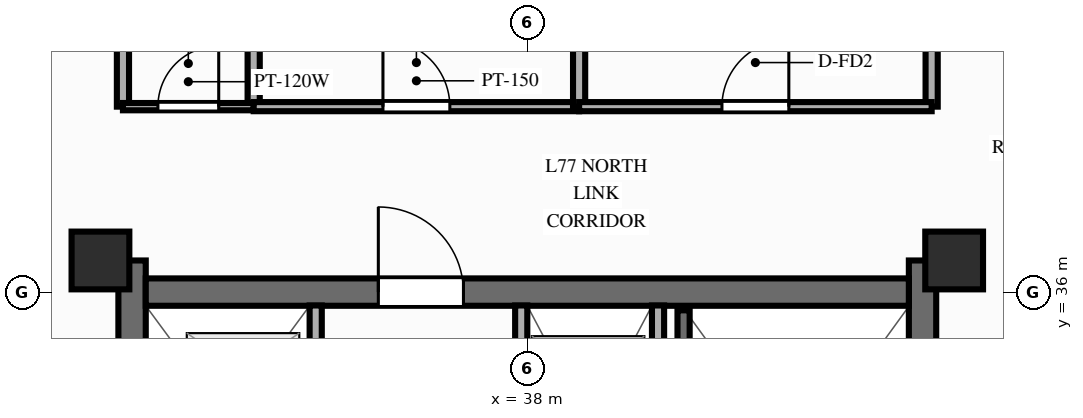
"""IFC4 building model, lengths in metres.
Left out: names, types, materials, properties, quantities, classifications, styles, units other than length and angle.
Written with IfcOpenShell. Run it as: python <this file> out.ifc"""

import sys

from ifc_helpers import new_model, si_unit, direction, frame, frame_2d, origin, origin_2d, place, context, subcontext, project, spatial, rectangle, extrude, source, transform, mapped, element, fill, save


model = new_model("IFC4")
c1 = context("Model", 3, precision=1e-05, world=origin(), true_north=direction((0.0, 1.0)))
c2 = subcontext(c1, "Body", "Model", "MODEL_VIEW")
j1 = project(units=[si_unit("LENGTHUNIT", "METRE"), si_unit("PLANEANGLEUNIT", "RADIAN")], contexts=[c1])
p1 = place(None, origin())
s1 = spatial("IfcSite", under=j1, at=p1, CompositionType="ELEMENT")
p2 = place(p1, origin())
s2 = spatial("IfcBuilding", under=s1, at=p2, CompositionType="ELEMENT")
p3 = place(p2, frame((0.0, 0.0, 249.0)))
s3 = spatial("IfcBuildingStorey", under=s2, at=p3, CompositionType="ELEMENT", Elevation=249.0)
p4 = place(p3, frame((31.5, 17.48, 0.0), z_axis=(0.0, 0.0, 1.0), x_axis=(0.0, 1.0, 0.0)))
e1 = element("IfcWall", 1, at=p4, inside=s3, PredefinedType="SHEAR", context=c2, shape_type="SweptSolid", body=[
    extrude(rectangle(XDim=19.04, YDim=0.45, at=frame_2d((9.52, 0.0))), origin(), (0.0, 0.0, 1.0), 3.2),
])
p5 = place(p4, frame((6.32, 0.0, 0.0)))
e2 = element("IfcOpeningElement", 2, at=p5, cuts=e1, PredefinedType="OPENING", context=c2, shape_type="SweptSolid", body=[
    extrude(rectangle(XDim=1.1, YDim=2.15, at=frame_2d((0.55, 1.075))), frame((0.0, 0.237, 0.0), z_axis=(0.0, -1.0, 0.0), x_axis=(1.0, 0.0, 0.0)), (0.0, 0.0, 1.0), 0.474),
])
p6 = place(p3, frame((44.5, 17.48, 0.0), z_axis=(0.0, 0.0, 1.0), x_axis=(0.0, 1.0, 0.0)))
e3 = element("IfcWall", 3, at=p6, inside=s3, PredefinedType="SHEAR", context=c2, shape_type="SweptSolid", body=[
    extrude(rectangle(XDim=19.04, YDim=0.45, at=frame_2d((9.52, 0.0))), origin(), (0.0, 0.0, 1.0), 3.2),
])
p7 = place(p6, frame((12.67, 0.0, 0.0), z_axis=(0.0, 0.0, 1.0), x_axis=(-1.0, 0.0, 0.0)))
e4 = element("IfcOpeningElement", 4, at=p7, cuts=e3, PredefinedType="OPENING", context=c2, shape_type="SweptSolid", body=[
    extrude(rectangle(XDim=1.1, YDim=2.15, at=frame_2d((0.55, 1.075))), frame((0.0, 0.237, 0.0), z_axis=(0.0, -1.0, 0.0), x_axis=(1.0, 0.0, 0.0)), (0.0, 0.0, 1.0), 0.474),
])
p8 = place(p3, frame((31.725, 36.0, 0.0), z_axis=(0.0, 0.0, 1.0), x_axis=(1.0, 0.0, 0.0)))
e5 = element("IfcWall", 5, at=p8, inside=s3, PredefinedType="SHEAR", context=c2, shape_type="SweptSolid", body=[
    extrude(rectangle(XDim=12.55, YDim=0.45, at=frame_2d((6.275, 0.0))), origin(), (0.0, 0.0, 1.0), 3.2),
])
p9 = place(p8, frame((5.225, 0.0, 0.0), z_axis=(0.0, 0.0, 1.0), x_axis=(-1.0, 0.0, 0.0)))
e6 = element("IfcOpeningElement", 6, at=p9, cuts=e5, PredefinedType="OPENING", context=c2, shape_type="SweptSolid", body=[
    extrude(rectangle(XDim=1.4, YDim=2.15, at=frame_2d((0.7, 1.075))), frame((0.0, 0.237, 0.0), z_axis=(0.0, -1.0, 0.0), x_axis=(1.0, 0.0, 0.0)), (0.0, 0.0, 1.0), 0.474),
])
m1 = source(origin(), c2, "Body", "SweptSolid", [
    extrude(rectangle(XDim=0.95, YDim=0.95, at=origin_2d()), origin(), (0.0, 0.0, 1.0), 3.2),
])
for number, where, z_axis, x_axis in (
    (7, (30.98, 36.52, 0.0), (0.0, 0.0, 1.0), (1.0, 0.0, 0.0)),
    (8, (45.02, 36.52, 0.0), (0.0, 0.0, 1.0), (1.0, 0.0, 0.0)),
):
    element("IfcColumn", number, at=place(p3, frame(where, z_axis=z_axis, x_axis=x_axis)), inside=s3, PredefinedType="COLUMN", context=c2, shape_type="MappedRepresentation", body=[
        mapped(m1, transform((0.0, 0.0, 0.0), scale=1.0)),
    ])
p10 = place(p3, frame((40.15, 31.8, 0.0), z_axis=(0.0, 0.0, 1.0), x_axis=(0.0, 1.0, 0.0)))
e9 = element("IfcWall", 9, at=p10, inside=s3, PredefinedType="PARTITIONING", context=c2, shape_type="SweptSolid", body=[
    extrude(rectangle(XDim=3.98, YDim=0.2, at=frame_2d((1.99, 0.0))), origin(), (0.0, 0.0, 1.0), 2.88),
])
p11 = place(p3, frame((40.57, 28.65, 0.0), z_axis=(0.0, 0.0, 1.0), x_axis=(0.0, 1.0, 0.0)))
e10 = element("IfcWall", 10, at=p11, inside=s3, PredefinedType="SOLIDWALL", context=c2, shape_type="SweptSolid", body=[
    extrude(rectangle(XDim=7.05, YDim=0.2, at=frame_2d((3.525, 0.0))), origin(), (0.0, 0.0, 1.0), 2.88),
])
p12 = place(p3, frame((34.52, 25.44, 0.0), z_axis=(0.0, 0.0, 1.0), x_axis=(0.0, 1.0, 0.0)))
e11 = element("IfcWall", 11, at=p12, inside=s3, PredefinedType="PARTITIONING", context=c2, shape_type="SweptSolid", body=[
    extrude(rectangle(XDim=10.34, YDim=0.2, at=frame_2d((5.17, 0.0))), origin(), (0.0, 0.0, 1.0), 2.88),
])
p13 = place(p12, frame((2.6, 0.0, 0.0)))
e12 = element("IfcOpeningElement", 12, at=p13, cuts=e11, PredefinedType="OPENING", context=c2, shape_type="SweptSolid", body=[
    extrude(rectangle(XDim=0.9, YDim=2.1, at=frame_2d((0.45, 1.05))), frame((0.0, 0.112, 0.0), z_axis=(0.0, -1.0, 0.0), x_axis=(1.0, 0.0, 0.0)), (0.0, 0.0, 1.0), 0.224),
])
p14 = place(p12, frame((7.01, 0.0, 0.0)))
e13 = element("IfcOpeningElement", 13, at=p14, cuts=e11, PredefinedType="OPENING", context=c2, shape_type="SweptSolid", body=[
    extrude(rectangle(XDim=1.0, YDim=2.15, at=frame_2d((0.5, 1.075))), frame((0.0, 0.112, 0.0), z_axis=(0.0, -1.0, 0.0), x_axis=(1.0, 0.0, 0.0)), (0.0, 0.0, 1.0), 0.224),
])
p15 = place(p12, frame((8.76, 0.0, 0.0)))
e14 = element("IfcOpeningElement", 14, at=p15, cuts=e11, PredefinedType="OPENING", context=c2, shape_type="SweptSolid", body=[
    extrude(rectangle(XDim=1.0, YDim=2.15, at=frame_2d((0.5, 1.075))), frame((0.0, 0.112, 0.0), z_axis=(0.0, -1.0, 0.0), x_axis=(1.0, 0.0, 0.0)), (0.0, 0.0, 1.0), 0.224),
])
p16 = place(p3, frame((37.9, 25.44, 0.0), z_axis=(0.0, 0.0, 1.0), x_axis=(0.0, 1.0, 0.0)))
e15 = element("IfcWall", 15, at=p16, inside=s3, PredefinedType="PARTITIONING", context=c2, shape_type="SweptSolid", body=[
    extrude(rectangle(XDim=10.34, YDim=0.2, at=frame_2d((5.17, 0.0))), origin(), (0.0, 0.0, 1.0), 2.88),
])
p17 = place(p16, frame((2.6, 0.0, 0.0)))
e16 = element("IfcOpeningElement", 16, at=p17, cuts=e15, PredefinedType="OPENING", context=c2, shape_type="SweptSolid", body=[
    extrude(rectangle(XDim=0.9, YDim=2.1, at=frame_2d((0.45, 1.05))), frame((0.0, 0.112, 0.0), z_axis=(0.0, -1.0, 0.0), x_axis=(1.0, 0.0, 0.0)), (0.0, 0.0, 1.0), 0.224),
])
p18 = place(p16, frame((6.86, 0.0, 0.0)))
e17 = element("IfcOpeningElement", 17, at=p18, cuts=e15, PredefinedType="OPENING", context=c2, shape_type="SweptSolid", body=[
    extrude(rectangle(XDim=1.0, YDim=2.15, at=frame_2d((0.5, 1.075))), frame((0.0, 0.112, 0.0), z_axis=(0.0, -1.0, 0.0), x_axis=(1.0, 0.0, 0.0)), (0.0, 0.0, 1.0), 0.224),
])
p19 = place(p16, frame((8.71, 0.0, 0.0)))
e18 = element("IfcOpeningElement", 18, at=p19, cuts=e15, PredefinedType="OPENING", context=c2, shape_type="SweptSolid", body=[
    extrude(rectangle(XDim=1.0, YDim=2.15, at=frame_2d((0.5, 1.075))), frame((0.0, 0.112, 0.0), z_axis=(0.0, -1.0, 0.0), x_axis=(1.0, 0.0, 0.0)), (0.0, 0.0, 1.0), 0.224),
])
for number, where, z_axis, x_axis in (
    (19, (31.35, 39.05, 0.0), (0.0, 0.0, 1.0), (0.0, 1.0, 0.0)),
    (20, (44.65, 39.05, 0.0), (0.0, 0.0, 1.0), (0.0, 1.0, 0.0)),
):
    element("IfcWall", number, at=place(p3, frame(where, z_axis=z_axis, x_axis=x_axis)), inside=s3, PredefinedType="PARTITIONING", context=c2, shape_type="SweptSolid", body=[
        extrude(rectangle(XDim=8.8, YDim=0.2, at=frame_2d((4.4, 0.0))), origin(), (0.0, 0.0, 1.0), 2.59),
    ])
p20 = place(p3, frame((33.5, 39.05, 0.0), z_axis=(0.0, 0.0, 1.0), x_axis=(0.0, 1.0, 0.0)))
e21 = element("IfcWall", 21, at=p20, inside=s3, PredefinedType="PARTITIONING", context=c2, shape_type="SweptSolid", body=[
    extrude(rectangle(XDim=8.8, YDim=0.2, at=frame_2d((4.4, 0.0))), origin(), (0.0, 0.0, 1.0), 2.88),
])
p21 = place(p3, frame((31.35, 39.05, 0.0), z_axis=(0.0, 0.0, 1.0), x_axis=(1.0, 0.0, 0.0)))
e22 = element("IfcWall", 22, at=p21, inside=s3, PredefinedType="PARTITIONING", context=c2, shape_type="SweptSolid", body=[
    extrude(rectangle(XDim=2.15, YDim=0.12, at=frame_2d((1.075, 0.0))), origin(), (0.0, 0.0, 1.0), 2.88),
])
p22 = place(p21, frame((0.575, 0.0, 0.0)))
e23 = element("IfcOpeningElement", 23, at=p22, cuts=e22, PredefinedType="OPENING", context=c2, shape_type="SweptSolid", body=[
    extrude(rectangle(XDim=1.0, YDim=2.1, at=frame_2d((0.5, 1.05))), frame((0.0, 0.072, 0.0), z_axis=(0.0, -1.0, 0.0), x_axis=(1.0, 0.0, 0.0)), (0.0, 0.0, 1.0), 0.144),
])
p23 = place(p3, frame((33.5, 39.05, 0.0), z_axis=(0.0, 0.0, 1.0), x_axis=(1.0, 0.0, 0.0)))
e24 = element("IfcWall", 24, at=p23, inside=s3, PredefinedType="PARTITIONING", context=c2, shape_type="SweptSolid", body=[
    extrude(rectangle(XDim=5.352, YDim=0.15, at=frame_2d((2.676, 0.0))), origin(), (0.0, 0.0, 1.0), 2.88),
])
p24 = place(p23, frame((2.126, 0.0, 0.0)))
e25 = element("IfcOpeningElement", 25, at=p24, cuts=e24, PredefinedType="OPENING", context=c2, shape_type="SweptSolid", body=[
    extrude(rectangle(XDim=1.1, YDim=2.15, at=frame_2d((0.55, 1.075))), frame((0.0, 0.087, 0.0), z_axis=(0.0, -1.0, 0.0), x_axis=(1.0, 0.0, 0.0)), (0.0, 0.0, 1.0), 0.174),
])
p25 = place(p3, frame((38.852, 39.05, 0.0), z_axis=(0.0, 0.0, 1.0), x_axis=(0.0, 1.0, 0.0)))
e26 = element("IfcWall", 26, at=p25, inside=s3, PredefinedType="PARTITIONING", context=c2, shape_type="SweptSolid", body=[
    extrude(rectangle(XDim=8.8, YDim=0.2, at=frame_2d((4.4, 0.0))), origin(), (0.0, 0.0, 1.0), 2.88),
])
p26 = place(p3, frame((38.852, 39.05, 0.0), z_axis=(0.0, 0.0, 1.0), x_axis=(1.0, 0.0, 0.0)))
e27 = element("IfcWall", 27, at=p26, inside=s3, PredefinedType="PARTITIONING", context=c2, shape_type="SweptSolid", body=[
    extrude(rectangle(XDim=5.798, YDim=0.15, at=frame_2d((2.899, 0.0))), origin(), (0.0, 0.0, 1.0), 2.88),
])
p27 = place(p26, frame((2.349, 0.0, 0.0)))
e28 = element("IfcOpeningElement", 28, at=p27, cuts=e27, PredefinedType="OPENING", context=c2, shape_type="SweptSolid", body=[
    extrude(rectangle(XDim=1.1, YDim=2.15, at=frame_2d((0.55, 1.075))), frame((0.0, 0.087, 0.0), z_axis=(0.0, -1.0, 0.0), x_axis=(1.0, 0.0, 0.0)), (0.0, 0.0, 1.0), 0.174),
])
m2 = source(origin(), c2, "Body", "SweptSolid", [
    extrude(rectangle(XDim=1.4, YDim=2.15, at=frame_2d((0.7, 1.075))), frame((0.0, 0.025, 0.0), z_axis=(0.0, -1.0, 0.0), x_axis=(1.0, 0.0, 0.0)), (0.0, 0.0, 1.0), 0.05),
])
p28 = place(p9, origin())
e29 = element("IfcDoor", 29, at=p28, inside=s3, OperationType="SINGLE_SWING_RIGHT", PredefinedType="DOOR", context=c2, shape_type="MappedRepresentation", body=[
    mapped(m2, transform((0.0, 0.0, 0.0), scale=1.0)),
])
fill(e6, e29)
m3 = source(origin(), c2, "Body", "SweptSolid", [
    extrude(rectangle(XDim=1.0, YDim=2.1, at=frame_2d((0.5, 1.05))), frame((0.0, 0.025, 0.0), z_axis=(0.0, -1.0, 0.0), x_axis=(1.0, 0.0, 0.0)), (0.0, 0.0, 1.0), 0.05),
])
p29 = place(p22, origin())
e30 = element("IfcDoor", 30, at=p29, inside=s3, OperationType="SINGLE_SWING_RIGHT", PredefinedType="DOOR", context=c2, shape_type="MappedRepresentation", body=[
    mapped(m3, transform((0.0, 0.0, 0.0), scale=1.0)),
])
fill(e23, e30)
m4 = source(origin(), c2, "Body", "SweptSolid", [
    extrude(rectangle(XDim=1.1, YDim=2.15, at=frame_2d((0.55, 1.075))), frame((0.0, 0.025, 0.0), z_axis=(0.0, -1.0, 0.0), x_axis=(1.0, 0.0, 0.0)), (0.0, 0.0, 1.0), 0.05),
])
p30 = place(p24, origin())
e31 = element("IfcDoor", 31, at=p30, inside=s3, OperationType="SINGLE_SWING_LEFT", PredefinedType="DOOR", context=c2, shape_type="MappedRepresentation", body=[
    mapped(m4, transform((0.0, 0.0, 0.0), scale=1.0)),
])
fill(e25, e31)
p31 = place(p27, origin())
e32 = element("IfcDoor", 32, at=p31, inside=s3, OperationType="SINGLE_SWING_RIGHT", PredefinedType="DOOR", context=c2, shape_type="MappedRepresentation", body=[
    mapped(m4, transform((0.0, 0.0, 0.0), scale=1.0)),
])
fill(e28, e32)
save(model, sys.argv[1])
